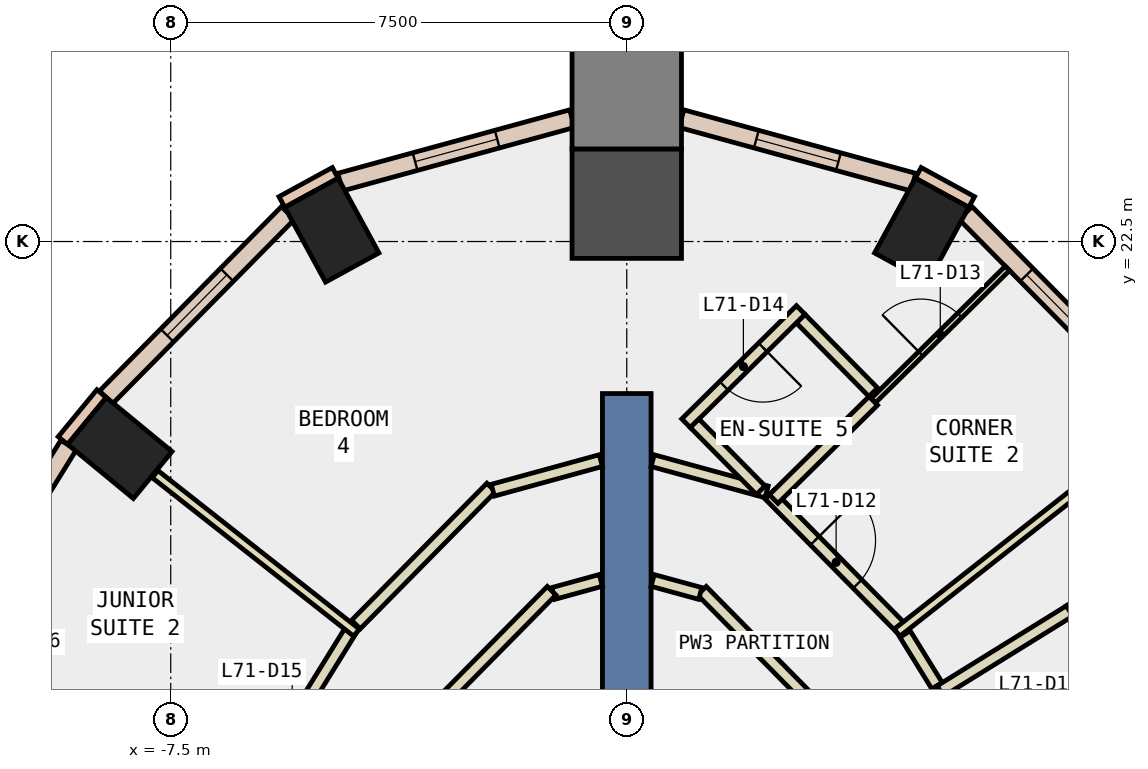
"""IFC4 building model, lengths in metres.
Left out: names, types, materials, properties, quantities, classifications, styles, units other than length and angle.
Written with IfcOpenShell. Run it as: python <this file> out.ifc"""

import sys

from ifc_helpers import new_model, si_unit, direction, frame, frame_2d, origin, origin_2d, place, context, subcontext, project, spatial, rectangle, extrude, element, fill, save


model = new_model("IFC4")
c1 = context("Model", 3, precision=1e-05, world=origin(), true_north=direction((0.0, 1.0)))
c2 = subcontext(c1, "Body", "Model", "MODEL_VIEW")
j1 = project(units=[si_unit("LENGTHUNIT", "METRE"), si_unit("PLANEANGLEUNIT", "RADIAN")], contexts=[c1])
p1 = place(None, origin())
s1 = spatial("IfcSite", under=j1, at=p1, CompositionType="ELEMENT")
p2 = place(p1, origin())
s2 = spatial("IfcBuilding", under=s1, at=p2, CompositionType="ELEMENT")
p3 = place(p2, frame((0.0, 0.0, 304.4)))
s3 = spatial("IfcBuildingStorey", under=s2, at=p3, CompositionType="ELEMENT", Elevation=304.4)
p4 = place(p3, frame((4.85, 22.687, -0.34), z_axis=(0.0, 0.0, 1.0), x_axis=(-0.877899414566, 0.478845087586, 0.0)))
e1 = element("IfcColumn", 1, at=p4, inside=s3, PredefinedType="COLUMN", context=c2, shape_type="SweptSolid", body=[
    extrude(rectangle(XDim=1.0, YDim=1.4, at=origin_2d()), origin(), (0.0, 0.0, 1.0), 3.6),
])
p5 = place(p3, frame((0.0, 23.123, -0.34), z_axis=(0.0, 0.0, 1.0), x_axis=(0.0, 1.0, 0.0)))
e2 = element("IfcColumn", 2, at=p5, inside=s3, PredefinedType="COLUMN", context=c2, shape_type="SweptSolid", body=[
    extrude(rectangle(XDim=1.8, YDim=1.8, at=origin_2d()), origin(), (0.0, 0.0, 1.0), 3.6),
])
for number, where, z_axis, x_axis in (
    (3, (-4.85, 22.687, -0.34), (0.0, 0.0, 1.0), (0.878, 0.479, 0.0)),
    (4, (-8.337, 19.105, -0.34), (0.0, 0.0, 1.0), (0.636, 0.772, 0.0)),
):
    element("IfcColumn", number, at=place(p3, frame(where, z_axis=z_axis, x_axis=x_axis)), inside=s3, PredefinedType="COLUMN", context=c2, shape_type="SweptSolid", body=[
        extrude(rectangle(XDim=1.0, YDim=1.4, at=origin_2d()), origin(), (0.0, 0.0, 1.0), 3.6),
    ])
p6 = place(p3, frame((0.0, 24.923, -0.34), z_axis=(0.0, 0.0, 1.0), x_axis=(0.0, 1.0, 0.0)))
e5 = element("IfcColumn", 5, at=p6, inside=s3, PredefinedType="COLUMN", context=c2, shape_type="SweptSolid", body=[
    extrude(rectangle(XDim=1.8, YDim=1.8, at=origin_2d()), origin(), (0.0, 0.0, 1.0), 3.6),
])
p7 = place(p3, frame((0.0, 11.0, -0.34), z_axis=(0.0, 0.0, 1.0), x_axis=(0.0, 1.0, 0.0)))
e6 = element("IfcWall", 6, at=p7, inside=s3, PredefinedType="SHEAR", context=c2, shape_type="SweptSolid", body=[
    extrude(rectangle(XDim=9.0, YDim=0.8, at=frame_2d((4.5, 0.0))), origin(), (0.0, 0.0, 1.0), 3.6),
])
for number, where, z_axis, x_axis in (
    (7, (5.672, 23.15, 0.0), (0.0, 0.0, 1.0), (-0.878, 0.479, 0.0)),
    (8, (-4.794, 23.629, 0.0), (0.0, 0.0, 1.0), (-0.878, -0.479, 0.0)),
    (9, (-8.637, 19.999, 0.0), (0.0, 0.0, 1.0), (-0.636, -0.772, 0.0)),
):
    element("IfcWall", number, at=place(p3, frame(where, z_axis=z_axis, x_axis=x_axis)), inside=s3, PredefinedType="STANDARD", context=c2, shape_type="SweptSolid", body=[
        extrude(rectangle(XDim=1.0, YDim=0.2, at=frame_2d((0.5, 0.0))), origin(), (0.0, 0.0, 1.0), 3.26),
    ])
p8 = place(p3, frame((8.564, 19.938, 0.0), z_axis=(0.0, 0.0, 1.0), x_axis=(-0.70250598769, 0.711677832491, 0.0)))
e10 = element("IfcWall", 10, at=p8, inside=s3, PredefinedType="STANDARD", context=c2, shape_type="SweptSolid", body=[
    extrude(rectangle(XDim=4.259, YDim=0.3, at=frame_2d((2.129, 0.0))), origin(), (0.0, 0.0, 1.0), 3.26),
])
p9 = place(p8, frame((1.429, 0.0, 0.9)))
e11 = element("IfcOpeningElement", 11, at=p9, cuts=e10, PredefinedType="OPENING", context=c2, shape_type="SweptSolid", body=[
    extrude(rectangle(XDim=1.4, YDim=2.0, at=frame_2d((0.7, 1.0))), frame((0.0, 0.16, 0.0), z_axis=(0.0, -1.0, 0.0), x_axis=(1.0, 0.0, 0.0)), (0.0, 0.0, 1.0), 0.32),
])
p10 = place(p3, frame((4.713, 23.477, 0.0), z_axis=(0.0, 0.0, 1.0), x_axis=(-0.964521196932, 0.264005417877, 0.0)))
e12 = element("IfcWall", 12, at=p10, inside=s3, PredefinedType="STANDARD", context=c2, shape_type="SweptSolid", body=[
    extrude(rectangle(XDim=3.954, YDim=0.3, at=frame_2d((1.977, 0.0))), origin(), (0.0, 0.0, 1.0), 3.26),
])
p11 = place(p10, frame((1.277, 0.0, 0.9)))
e13 = element("IfcOpeningElement", 13, at=p11, cuts=e12, PredefinedType="OPENING", context=c2, shape_type="SweptSolid", body=[
    extrude(rectangle(XDim=1.4, YDim=2.0, at=frame_2d((0.7, 1.0))), frame((0.0, 0.16, 0.0), z_axis=(0.0, -1.0, 0.0), x_axis=(1.0, 0.0, 0.0)), (0.0, 0.0, 1.0), 0.32),
])
p12 = place(p3, frame((-0.899, 24.521, 0.0), z_axis=(0.0, 0.0, 1.0), x_axis=(-0.964521196932, -0.264005417877, 0.0)))
e14 = element("IfcWall", 14, at=p12, inside=s3, PredefinedType="STANDARD", context=c2, shape_type="SweptSolid", body=[
    extrude(rectangle(XDim=3.954, YDim=0.3, at=frame_2d((1.977, 0.0))), origin(), (0.0, 0.0, 1.0), 3.26),
])
p13 = place(p12, frame((1.277, 0.0, 0.9)))
e15 = element("IfcOpeningElement", 15, at=p13, cuts=e14, PredefinedType="OPENING", context=c2, shape_type="SweptSolid", body=[
    extrude(rectangle(XDim=1.4, YDim=2.0, at=frame_2d((0.7, 1.0))), frame((0.0, 0.16, 0.0), z_axis=(0.0, -1.0, 0.0), x_axis=(1.0, 0.0, 0.0)), (0.0, 0.0, 1.0), 0.32),
])
p14 = place(p3, frame((-5.572, 22.969, 0.0), z_axis=(0.0, 0.0, 1.0), x_axis=(-0.70250598769, -0.711677832491, 0.0)))
e16 = element("IfcWall", 16, at=p14, inside=s3, PredefinedType="STANDARD", context=c2, shape_type="SweptSolid", body=[
    extrude(rectangle(XDim=4.259, YDim=0.3, at=frame_2d((2.129, 0.0))), origin(), (0.0, 0.0, 1.0), 3.26),
])
p15 = place(p14, frame((1.429, 0.0, 0.9)))
e17 = element("IfcOpeningElement", 17, at=p15, cuts=e16, PredefinedType="OPENING", context=c2, shape_type="SweptSolid", body=[
    extrude(rectangle(XDim=1.4, YDim=2.0, at=frame_2d((0.7, 1.0))), frame((0.0, 0.16, 0.0), z_axis=(0.0, -1.0, 0.0), x_axis=(1.0, 0.0, 0.0)), (0.0, 0.0, 1.0), 0.32),
])
p16 = place(p3, frame((-9.18, 19.153, 0.0), z_axis=(0.0, 0.0, 1.0), x_axis=(-0.526409529565, -0.850231149267, 0.0)))
e18 = element("IfcWall", 18, at=p16, inside=s3, PredefinedType="STANDARD", context=c2, shape_type="SweptSolid", body=[
    extrude(rectangle(XDim=7.346, YDim=0.3, at=frame_2d((3.673, 0.0))), origin(), (0.0, 0.0, 1.0), 3.26),
])
p17 = place(p16, frame((0.737, 0.0, 0.9)))
e19 = element("IfcOpeningElement", 19, at=p17, cuts=e18, PredefinedType="OPENING", context=c2, shape_type="SweptSolid", body=[
    extrude(rectangle(XDim=2.2, YDim=2.0, at=frame_2d((1.1, 1.0))), frame((0.0, 0.16, 0.0), z_axis=(0.0, -1.0, 0.0), x_axis=(1.0, 0.0, 0.0)), (0.0, 0.0, 1.0), 0.32),
])
p18 = place(p16, frame((4.41, 0.0, 0.9)))
e20 = element("IfcOpeningElement", 20, at=p18, cuts=e18, PredefinedType="OPENING", context=c2, shape_type="SweptSolid", body=[
    extrude(rectangle(XDim=2.2, YDim=2.0, at=frame_2d((1.1, 1.0))), frame((0.0, 0.16, 0.0), z_axis=(0.0, -1.0, 0.0), x_axis=(1.0, 0.0, 0.0)), (0.0, 0.0, 1.0), 0.32),
])
p19 = place(p3, frame((2.951, 15.019, 0.0), z_axis=(0.0, 0.0, 1.0), x_axis=(-0.702341227034, 0.711840432126, 0.0)))
e21 = element("IfcWall", 21, at=p19, inside=s3, PredefinedType="PARTITIONING", context=c2, shape_type="SweptSolid", body=[
    extrude(rectangle(XDim=2.442, YDim=0.2, at=frame_2d((1.221, 0.0))), origin(), (0.0, 0.0, 1.0), 3.26),
])
p20 = place(p3, frame((1.209, 16.712, 0.0), z_axis=(0.0, 0.0, 1.0), x_axis=(-0.964583129746, 0.26377904733, 0.0)))
e22 = element("IfcWall", 22, at=p20, inside=s3, PredefinedType="PARTITIONING", context=c2, shape_type="SweptSolid", body=[
    extrude(rectangle(XDim=0.812, YDim=0.2, at=frame_2d((0.406, 0.0))), origin(), (0.0, 0.0, 1.0), 3.26),
])
p21 = place(p3, frame((-0.426, 16.927, 0.0), z_axis=(0.0, 0.0, 1.0), x_axis=(-0.964276465753, -0.264897900321, 0.0)))
e23 = element("IfcWall", 23, at=p21, inside=s3, PredefinedType="PARTITIONING", context=c2, shape_type="SweptSolid", body=[
    extrude(rectangle(XDim=0.812, YDim=0.2, at=frame_2d((0.406, 0.0))), origin(), (0.0, 0.0, 1.0), 3.26),
])
p22 = place(p3, frame((-1.236, 16.757, 0.0), z_axis=(0.0, 0.0, 1.0), x_axis=(-0.702341227034, -0.711840432126, 0.0)))
e24 = element("IfcWall", 24, at=p22, inside=s3, PredefinedType="PARTITIONING", context=c2, shape_type="SweptSolid", body=[
    extrude(rectangle(XDim=2.442, YDim=0.2, at=frame_2d((1.221, 0.0))), origin(), (0.0, 0.0, 1.0), 3.26),
])
p23 = place(p3, frame((4.577, 16.045, 0.0), z_axis=(0.0, 0.0, 1.0), x_axis=(0.526203576349, -0.850358628014, 0.0)))
e25 = element("IfcWall", 25, at=p23, inside=s3, PredefinedType="PARTITIONING", context=c2, shape_type="SweptSolid", body=[
    extrude(rectangle(XDim=1.002, YDim=0.2, at=frame_2d((0.501, 0.0))), origin(), (0.0, 0.0, 1.0), 3.26),
])
p24 = place(p3, frame((5.104, 15.193, 0.0), z_axis=(0.0, 0.0, 1.0), x_axis=(0.526329401671, -0.850280754184, 0.0)))
e26 = element("IfcWall", 26, at=p24, inside=s3, PredefinedType="PARTITIONING", context=c2, shape_type="SweptSolid", body=[
    extrude(rectangle(XDim=3.0, YDim=0.2, at=frame_2d((1.5, 0.0))), origin(), (0.0, 0.0, 1.0), 3.26),
])
p25 = place(p3, frame((2.346, 18.336, 0.0), z_axis=(0.0, 0.0, 1.0), x_axis=(0.702481985573, -0.711701524479, 0.0)))
e27 = element("IfcWall", 27, at=p25, inside=s3, PredefinedType="PARTITIONING", context=c2, shape_type="SweptSolid", body=[
    extrude(rectangle(XDim=3.125, YDim=0.2, at=frame_2d((1.562, 0.0))), origin(), (0.0, 0.0, 1.0), 3.26),
])
p26 = place(p25, frame((1.062, 0.0, 0.0)))
e28 = element("IfcOpeningElement", 28, at=p26, cuts=e27, PredefinedType="OPENING", context=c2, shape_type="SweptSolid", body=[
    extrude(rectangle(XDim=1.0, YDim=2.1, at=frame_2d((0.5, 1.05))), frame((0.0, 0.11, 0.0), z_axis=(0.0, -1.0, 0.0), x_axis=(1.0, 0.0, 0.0)), (0.0, 0.0, 1.0), 0.22),
])
p27 = place(p3, frame((-4.454, 16.201, 0.0), z_axis=(0.0, 0.0, 1.0), x_axis=(0.702505657511, 0.711678158415, 0.0)))
e29 = element("IfcWall", 29, at=p27, inside=s3, PredefinedType="PARTITIONING", context=c2, shape_type="SweptSolid", body=[
    extrude(rectangle(XDim=3.167, YDim=0.2, at=frame_2d((1.584, 0.0))), origin(), (0.0, 0.0, 1.0), 3.26),
])
p28 = place(p3, frame((-2.203, 18.41, 0.0), z_axis=(0.0, 0.0, 1.0), x_axis=(0.964423583418, 0.264361781934, 0.0)))
e30 = element("IfcWall", 30, at=p28, inside=s3, PredefinedType="PARTITIONING", context=c2, shape_type="SweptSolid", body=[
    extrude(rectangle(XDim=1.842, YDim=0.2, at=frame_2d((0.921, 0.0))), origin(), (0.0, 0.0, 1.0), 3.26),
])
p29 = place(p3, frame((0.426, 18.896, 0.0), z_axis=(0.0, 0.0, 1.0), x_axis=(0.964522741234, -0.263999775838, 0.0)))
e31 = element("IfcWall", 31, at=p29, inside=s3, PredefinedType="PARTITIONING", context=c2, shape_type="SweptSolid", body=[
    extrude(rectangle(XDim=1.943, YDim=0.2, at=frame_2d((0.971, 0.0))), origin(), (0.0, 0.0, 1.0), 3.26),
])
p30 = place(p3, frame((-6.493, 12.95, 0.0), z_axis=(0.0, 0.0, 1.0), x_axis=(0.526432748426, 0.850216773173, 0.0)))
e32 = element("IfcWall", 32, at=p30, inside=s3, PredefinedType="PARTITIONING", context=c2, shape_type="SweptSolid", body=[
    extrude(rectangle(XDim=3.765, YDim=0.2, at=frame_2d((1.882, 0.0))), origin(), (0.0, 0.0, 1.0), 3.26),
])
p31 = place(p30, frame((1.383, 0.0, 0.0)))
e33 = element("IfcOpeningElement", 33, at=p31, cuts=e32, PredefinedType="OPENING", context=c2, shape_type="SweptSolid", body=[
    extrude(rectangle(XDim=1.0, YDim=2.1, at=frame_2d((0.5, 1.05))), frame((0.0, 0.11, 0.0), z_axis=(0.0, -1.0, 0.0), x_axis=(1.0, 0.0, 0.0)), (0.0, 0.0, 1.0), 0.22),
])
p32 = place(p3, frame((8.999, 13.841, 0.0), z_axis=(0.0, 0.0, 1.0), x_axis=(-0.526283695852, 0.850309044689, 0.0)))
e34 = element("IfcWall", 34, at=p32, inside=s3, PredefinedType="PARTITIONING", context=c2, shape_type="SweptSolid", body=[
    extrude(rectangle(XDim=3.2, YDim=0.2, at=frame_2d((1.6, 0.0))), origin(), (0.0, 0.0, 1.0), 3.26),
])
p33 = place(p32, frame((1.15, 0.0, 0.0)))
e35 = element("IfcOpeningElement", 35, at=p33, cuts=e34, PredefinedType="OPENING", context=c2, shape_type="SweptSolid", body=[
    extrude(rectangle(XDim=0.9, YDim=2.1, at=frame_2d((0.45, 1.05))), frame((0.0, 0.11, 0.0), z_axis=(0.0, -1.0, 0.0), x_axis=(1.0, 0.0, 0.0)), (0.0, 0.0, 1.0), 0.22),
])
p34 = place(p3, frame((7.282, 16.424, 0.0), z_axis=(0.0, 0.0, 1.0), x_axis=(-0.850142312258, -0.526552987751, 0.0)))
e36 = element("IfcWall", 36, at=p34, inside=s3, PredefinedType="PARTITIONING", context=c2, shape_type="SweptSolid", body=[
    extrude(rectangle(XDim=2.5, YDim=0.2, at=frame_2d((1.25, 0.0))), origin(), (0.0, 0.0, 1.0), 3.26),
])
p35 = place(p3, frame((4.445, 16.068, 0.0), z_axis=(0.0, 0.0, 1.0), x_axis=(0.785872006963, 0.618389188677, 0.0)))
e37 = element("IfcWall", 37, at=p35, inside=s3, PredefinedType="PARTITIONING", context=c2, shape_type="SweptSolid", body=[
    extrude(rectangle(XDim=4.216, YDim=0.15, at=frame_2d((2.108, 0.0))), origin(), (0.0, 0.0, 1.0), 3.26),
])
p36 = place(p3, frame((4.053, 19.881, 0.0), z_axis=(0.0, 0.0, 1.0), x_axis=(0.711776071152, 0.702406452516, 0.0)))
e38 = element("IfcWall", 38, at=p36, inside=s3, PredefinedType="PARTITIONING", context=c2, shape_type="SweptSolid", body=[
    extrude(rectangle(XDim=3.101, YDim=0.1, at=frame_2d((1.55, 0.0))), origin(), (0.0, 0.0, 1.0), 3.26),
])
p37 = place(p36, frame((1.1, 0.0, 0.0)))
e39 = element("IfcOpeningElement", 39, at=p37, cuts=e38, PredefinedType="OPENING", context=c2, shape_type="SweptSolid", body=[
    extrude(rectangle(XDim=0.9, YDim=2.1, at=frame_2d((0.45, 1.05))), frame((0.0, 0.06, 0.0), z_axis=(0.0, -1.0, 0.0), x_axis=(1.0, 0.0, 0.0)), (0.0, 0.0, 1.0), 0.12),
])
p38 = place(p3, frame((2.416, 18.265, 0.0), z_axis=(0.0, 0.0, 1.0), x_axis=(0.71207765541, 0.702100714047, 0.0)))
e40 = element("IfcWall", 40, at=p38, inside=s3, PredefinedType="PARTITIONING", context=c2, shape_type="SweptSolid", body=[
    extrude(rectangle(XDim=2.3, YDim=0.2, at=frame_2d((1.15, 0.0))), origin(), (0.0, 0.0, 1.0), 3.26),
])
p39 = place(p3, frame((4.054, 20.022, 0.0), z_axis=(0.0, 0.0, 1.0), x_axis=(-0.702351102688, 0.711830688123, 0.0)))
e41 = element("IfcWall", 41, at=p39, inside=s3, PredefinedType="PARTITIONING", context=c2, shape_type="SweptSolid", body=[
    extrude(rectangle(XDim=1.7, YDim=0.2, at=frame_2d((0.85, 0.0))), origin(), (0.0, 0.0, 1.0), 3.26),
])
p40 = place(p3, frame((2.861, 21.374, 0.0), z_axis=(0.0, 0.0, 1.0), x_axis=(-0.711606122075, -0.702578626934, 0.0)))
e42 = element("IfcWall", 42, at=p40, inside=s3, PredefinedType="PARTITIONING", context=c2, shape_type="SweptSolid", body=[
    extrude(rectangle(XDim=2.65, YDim=0.2, at=frame_2d((1.325, 0.0))), origin(), (0.0, 0.0, 1.0), 3.26),
])
p41 = place(p40, frame((0.875, 0.0, 0.0)))
e43 = element("IfcOpeningElement", 43, at=p41, cuts=e42, PredefinedType="OPENING", context=c2, shape_type="SweptSolid", body=[
    extrude(rectangle(XDim=0.9, YDim=2.1, at=frame_2d((0.45, 1.05))), frame((0.0, 0.11, 0.0), z_axis=(0.0, -1.0, 0.0), x_axis=(1.0, 0.0, 0.0)), (0.0, 0.0, 1.0), 0.22),
])
p42 = place(p3, frame((1.116, 19.511, 0.0), z_axis=(0.0, 0.0, 1.0), x_axis=(0.702515837086, -0.711668109896, 0.0)))
e44 = element("IfcWall", 44, at=p42, inside=s3, PredefinedType="PARTITIONING", context=c2, shape_type="SweptSolid", body=[
    extrude(rectangle(XDim=1.547, YDim=0.2, at=frame_2d((0.773, 0.0))), origin(), (0.0, 0.0, 1.0), 3.26),
])
p43 = place(p3, frame((-4.445, 16.068, 0.0), z_axis=(0.0, 0.0, 1.0), x_axis=(-0.785872006963, 0.618389188677, 0.0)))
e45 = element("IfcWall", 45, at=p43, inside=s3, PredefinedType="PARTITIONING", context=c2, shape_type="SweptSolid", body=[
    extrude(rectangle(XDim=4.216, YDim=0.15, at=frame_2d((2.108, 0.0))), origin(), (0.0, 0.0, 1.0), 3.26),
])
p44 = place(p3, frame((-8.906, 14.562, 0.0), z_axis=(0.0, 0.0, 1.0), x_axis=(-0.850186034224, 0.526482390219, 0.0)))
e46 = element("IfcWall", 46, at=p44, inside=s3, PredefinedType="PARTITIONING", context=c2, shape_type="SweptSolid", body=[
    extrude(rectangle(XDim=2.5, YDim=0.1, at=frame_2d((1.25, 0.0))), origin(), (0.0, 0.0, 1.0), 3.26),
])
p45 = place(p44, frame((0.8, 0.0, 0.0)))
e47 = element("IfcOpeningElement", 47, at=p45, cuts=e46, PredefinedType="OPENING", context=c2, shape_type="SweptSolid", body=[
    extrude(rectangle(XDim=0.9, YDim=2.1, at=frame_2d((0.45, 1.05))), frame((0.0, 0.06, 0.0), z_axis=(0.0, -1.0, 0.0), x_axis=(1.0, 0.0, 0.0)), (0.0, 0.0, 1.0), 0.12),
])
p46 = place(p9, origin())
e48 = element("IfcWindow", 48, at=p46, inside=s3, PartitioningType="SINGLE_PANEL", PredefinedType="WINDOW", context=c2, shape_type="SweptSolid", body=[
    extrude(rectangle(XDim=1.4, YDim=2.0, at=frame_2d((0.7, 1.0))), frame((0.0, 0.03, 0.0), z_axis=(0.0, -1.0, 0.0), x_axis=(1.0, 0.0, 0.0)), (0.0, 0.0, 1.0), 0.06),
])
fill(e11, e48)
p47 = place(p11, origin())
e49 = element("IfcWindow", 49, at=p47, inside=s3, PartitioningType="SINGLE_PANEL", PredefinedType="WINDOW", context=c2, shape_type="SweptSolid", body=[
    extrude(rectangle(XDim=1.4, YDim=2.0, at=frame_2d((0.7, 1.0))), frame((0.0, 0.03, 0.0), z_axis=(0.0, -1.0, 0.0), x_axis=(1.0, 0.0, 0.0)), (0.0, 0.0, 1.0), 0.06),
])
fill(e13, e49)
p48 = place(p13, origin())
e50 = element("IfcWindow", 50, at=p48, inside=s3, PartitioningType="SINGLE_PANEL", PredefinedType="WINDOW", context=c2, shape_type="SweptSolid", body=[
    extrude(rectangle(XDim=1.4, YDim=2.0, at=frame_2d((0.7, 1.0))), frame((0.0, 0.03, 0.0), z_axis=(0.0, -1.0, 0.0), x_axis=(1.0, 0.0, 0.0)), (0.0, 0.0, 1.0), 0.06),
])
fill(e15, e50)
p49 = place(p15, origin())
e51 = element("IfcWindow", 51, at=p49, inside=s3, PartitioningType="SINGLE_PANEL", PredefinedType="WINDOW", context=c2, shape_type="SweptSolid", body=[
    extrude(rectangle(XDim=1.4, YDim=2.0, at=frame_2d((0.7, 1.0))), frame((0.0, 0.03, 0.0), z_axis=(0.0, -1.0, 0.0), x_axis=(1.0, 0.0, 0.0)), (0.0, 0.0, 1.0), 0.06),
])
fill(e17, e51)
p50 = place(p26, origin())
e52 = element("IfcDoor", 52, at=p50, inside=s3, OperationType="SINGLE_SWING_LEFT", PredefinedType="DOOR", context=c2, shape_type="SweptSolid", body=[
    extrude(rectangle(XDim=1.0, YDim=2.1, at=frame_2d((0.5, 1.05))), frame((0.0, 0.025, 0.0), z_axis=(0.0, -1.0, 0.0), x_axis=(1.0, 0.0, 0.0)), (0.0, 0.0, 1.0), 0.05),
])
fill(e28, e52)
p51 = place(p37, origin())
e53 = element("IfcDoor", 53, at=p51, inside=s3, OperationType="SINGLE_SWING_LEFT", PredefinedType="DOOR", context=c2, shape_type="SweptSolid", body=[
    extrude(rectangle(XDim=0.9, YDim=2.1, at=frame_2d((0.45, 1.05))), frame((0.0, 0.025, 0.0), z_axis=(0.0, -1.0, 0.0), x_axis=(1.0, 0.0, 0.0)), (0.0, 0.0, 1.0), 0.05),
])
fill(e39, e53)
p52 = place(p41, origin())
e54 = element("IfcDoor", 54, at=p52, inside=s3, OperationType="SINGLE_SWING_LEFT", PredefinedType="DOOR", context=c2, shape_type="SweptSolid", body=[
    extrude(rectangle(XDim=0.9, YDim=2.1, at=frame_2d((0.45, 1.05))), frame((0.0, 0.025, 0.0), z_axis=(0.0, -1.0, 0.0), x_axis=(1.0, 0.0, 0.0)), (0.0, 0.0, 1.0), 0.05),
])
fill(e43, e54)
save(model, sys.argv[1])
